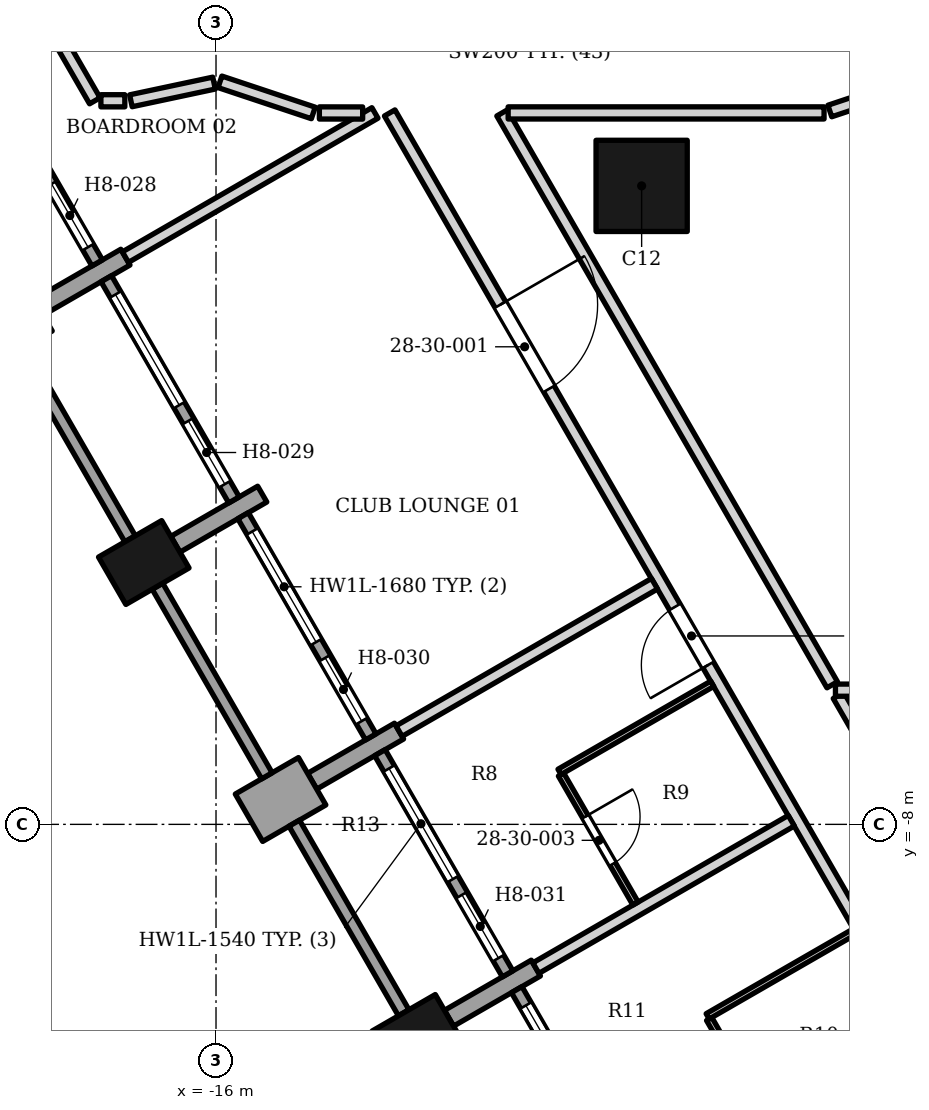
"""IFC4 building model, lengths in metres.
Left out: names, types, materials, properties, quantities, classifications, styles, units other than length and angle.
Written with IfcOpenShell. Run it as: python <this file> out.ifc"""

import sys

from ifc_helpers import new_model, si_unit, direction, frame, frame_2d, origin, origin_2d, place, context, subcontext, project, spatial, rectangle, extrude, element, fill, save


model = new_model("IFC4")
c1 = context("Model", 3, precision=1e-05, world=origin(), true_north=direction((0.0, 1.0)))
c2 = subcontext(c1, "Body", "Model", "MODEL_VIEW")
j1 = project(units=[si_unit("LENGTHUNIT", "METRE"), si_unit("PLANEANGLEUNIT", "RADIAN")], contexts=[c1])
p1 = place(None, origin())
s1 = spatial("IfcSite", under=j1, at=p1, CompositionType="ELEMENT")
p2 = place(p1, origin())
s2 = spatial("IfcBuilding", under=s1, at=p2, CompositionType="ELEMENT")
p3 = place(p2, frame((0.0, 0.0, 122.4)))
s3 = spatial("IfcBuildingStorey", under=s2, at=p3, CompositionType="ELEMENT", Elevation=122.4)
p4 = place(p3, frame((-9.0, 2.5, 0.0), z_axis=(0.0, 0.0, 1.0), x_axis=(1.0, 0.0, 0.0)))
e1 = element("IfcColumn", 1, at=p4, inside=s3, PredefinedType="COLUMN", context=c2, shape_type="SweptSolid", body=[
    extrude(rectangle(XDim=1.5, YDim=1.5, at=origin_2d()), origin(), (0.0, 0.0, 1.0), 3.4),
])
for number, where, z_axis, x_axis in (
    (2, (-17.188, -3.694, 0.0), (0.0, 0.0, 1.0), (0.5, -0.866, 0.0)),
    (3, (-12.688, -11.488, 0.0), (0.0, 0.0, 1.0), (0.5, -0.866, 0.0)),
):
    element("IfcColumn", number, at=place(p3, frame(where, z_axis=z_axis, x_axis=x_axis)), inside=s3, PredefinedType="COLUMN", context=c2, shape_type="SweptSolid", body=[
        extrude(rectangle(XDim=0.9, YDim=1.2, at=origin_2d()), origin(), (0.0, 0.0, 1.0), 3.4),
    ])
p5 = place(p3, frame((-19.958, -0.097, 0.0), z_axis=(0.0, 0.0, 1.0), x_axis=(0.865955154139, 0.50012165622, 0.0)))
e4 = element("IfcWall", 4, at=p5, inside=s3, PredefinedType="SOLIDWALL", context=c2, shape_type="SweptSolid", body=[
    extrude(rectangle(XDim=1.2, YDim=0.9, at=frame_2d((0.6, 0.0))), origin(), (0.0, 0.0, 1.0), 2.63),
])
p6 = place(p3, frame((-18.919, 0.503, 0.0), z_axis=(0.0, 0.0, 1.0), x_axis=(0.866040211805, 0.499974350878, 0.0)))
e5 = element("IfcWall", 5, at=p6, inside=s3, PredefinedType="SOLIDWALL", context=c2, shape_type="SweptSolid", body=[
    extrude(rectangle(XDim=1.65, YDim=0.3, at=frame_2d((0.825, 0.0))), origin(), (0.0, 0.0, 1.0), 2.65),
])
p7 = place(p3, frame((-16.668, -3.394, 0.0), z_axis=(0.0, 0.0, 1.0), x_axis=(0.866003217194, 0.500038426333, 0.0)))
e6 = element("IfcWall", 6, at=p7, inside=s3, PredefinedType="SOLIDWALL", context=c2, shape_type="SweptSolid", body=[
    extrude(rectangle(XDim=1.65, YDim=0.3, at=frame_2d((0.825, 0.0))), origin(), (0.0, 0.0, 1.0), 2.628),
])
p8 = place(p3, frame((-15.458, -7.891, 0.0), z_axis=(0.0, 0.0, 1.0), x_axis=(0.866043267704, 0.499969057507, 0.0)))
e7 = element("IfcWall", 7, at=p8, inside=s3, PredefinedType="SOLIDWALL", context=c2, shape_type="SweptSolid", body=[
    extrude(rectangle(XDim=1.2, YDim=0.9, at=frame_2d((0.6, 0.0))), origin(), (0.0, 0.0, 1.0), 2.63),
])
p9 = place(p3, frame((-14.419, -7.291, 0.0), z_axis=(0.0, 0.0, 1.0), x_axis=(0.865976140824, 0.500085316245, 0.0)))
e8 = element("IfcWall", 8, at=p9, inside=s3, PredefinedType="SOLIDWALL", context=c2, shape_type="SweptSolid", body=[
    extrude(rectangle(XDim=1.65, YDim=0.3, at=frame_2d((0.825, 0.0))), origin(), (0.0, 0.0, 1.0), 2.384),
])
p10 = place(p3, frame((-12.168, -11.188, 0.0), z_axis=(0.0, 0.0, 1.0), x_axis=(0.865966208357, 0.500102515474, 0.0)))
e9 = element("IfcWall", 9, at=p10, inside=s3, PredefinedType="SOLIDWALL", context=c2, shape_type="SweptSolid", body=[
    extrude(rectangle(XDim=1.65, YDim=0.3, at=frame_2d((0.825, 0.0))), origin(), (0.0, 0.0, 1.0), 2.242),
])
p11 = place(p3, frame((-20.054, 4.87, 0.0), z_axis=(0.0, 0.0, 1.0), x_axis=(0.500002543286, -0.866023935413, 0.0)))
e10 = element("IfcWall", 10, at=p11, inside=s3, PredefinedType="ELEMENTEDWALL", context=c2, shape_type="SweptSolid", body=[
    extrude(rectangle(XDim=4.2, YDim=0.2, at=frame_2d((2.1, 0.0))), origin(), (0.0, 0.0, 1.0), 2.45),
])
p12 = place(p11, frame((0.3, 0.0, 0.6)))
e11 = element("IfcOpeningElement", 11, at=p12, cuts=e10, PredefinedType="OPENING", context=c2, shape_type="SweptSolid", body=[
    extrude(rectangle(XDim=2.1, YDim=1.75, at=frame_2d((1.05, 0.875))), frame((0.0, 0.11, 0.0), z_axis=(0.0, -1.0, 0.0), x_axis=(1.0, 0.0, 0.0)), (0.0, 0.0, 1.0), 0.22),
])
p13 = place(p11, frame((2.7, 0.0, 0.0)))
e12 = element("IfcOpeningElement", 12, at=p13, cuts=e10, PredefinedType="OPENING", context=c2, shape_type="SweptSolid", body=[
    extrude(rectangle(XDim=1.2, YDim=2.35, at=frame_2d((0.6, 1.175))), frame((0.0, 0.11, 0.0), z_axis=(0.0, -1.0, 0.0), x_axis=(1.0, 0.0, 0.0)), (0.0, 0.0, 1.0), 0.22),
])
p14 = place(p3, frame((-19.213, -0.187, 0.0), z_axis=(0.0, 0.0, 1.0), x_axis=(0.499982693035, -0.866035395735, 0.0)))
e13 = element("IfcWall", 13, at=p14, inside=s3, PredefinedType="SOLIDWALL", context=c2, shape_type="SweptSolid", body=[
    extrude(rectangle(XDim=3.6, YDim=0.2, at=frame_2d((1.8, 0.0))), origin(), (0.0, 0.0, 1.0), 2.63),
])
p15 = place(p3, frame((-17.804, 0.973, 0.0), z_axis=(0.0, 0.0, 1.0), x_axis=(0.500027713859, -0.866009402589, 0.0)))
e14 = element("IfcWall", 14, at=p15, inside=s3, PredefinedType="ELEMENTEDWALL", context=c2, shape_type="SweptSolid", body=[
    extrude(rectangle(XDim=4.2, YDim=0.2, at=frame_2d((2.1, 0.0))), origin(), (0.0, 0.0, 1.0), 2.628),
])
p16 = place(p15, frame((0.3, 0.0, 0.6)))
e15 = element("IfcOpeningElement", 15, at=p16, cuts=e14, PredefinedType="OPENING", context=c2, shape_type="SweptSolid", body=[
    extrude(rectangle(XDim=2.1, YDim=1.8, at=frame_2d((1.05, 0.9))), frame((0.0, 0.11, 0.0), z_axis=(0.0, -1.0, 0.0), x_axis=(1.0, 0.0, 0.0)), (0.0, 0.0, 1.0), 0.22),
])
p17 = place(p15, frame((2.7, 0.0, 0.0)))
e16 = element("IfcOpeningElement", 16, at=p17, cuts=e14, PredefinedType="OPENING", context=c2, shape_type="SweptSolid", body=[
    extrude(rectangle(XDim=1.2, YDim=2.4, at=frame_2d((0.6, 1.2))), frame((0.0, 0.11, 0.0), z_axis=(0.0, -1.0, 0.0), x_axis=(1.0, 0.0, 0.0)), (0.0, 0.0, 1.0), 0.22),
])
p18 = place(p3, frame((-16.963, -4.084, 0.0), z_axis=(0.0, 0.0, 1.0), x_axis=(0.500012057535, -0.866018442252, 0.0)))
e17 = element("IfcWall", 17, at=p18, inside=s3, PredefinedType="SOLIDWALL", context=c2, shape_type="SweptSolid", body=[
    extrude(rectangle(XDim=3.6, YDim=0.2, at=frame_2d((1.8, 0.0))), origin(), (0.0, 0.0, 1.0), 2.63),
])
p19 = place(p3, frame((-15.554, -2.924, 0.0), z_axis=(0.0, 0.0, 1.0), x_axis=(0.500002543286, -0.866023935413, 0.0)))
e18 = element("IfcWall", 18, at=p19, inside=s3, PredefinedType="ELEMENTEDWALL", context=c2, shape_type="SweptSolid", body=[
    extrude(rectangle(XDim=4.2, YDim=0.2, at=frame_2d((2.1, 0.0))), origin(), (0.0, 0.0, 1.0), 2.384),
])
p20 = place(p19, frame((0.3, 0.0, 0.6)))
e19 = element("IfcOpeningElement", 19, at=p20, cuts=e18, PredefinedType="OPENING", context=c2, shape_type="SweptSolid", body=[
    extrude(rectangle(XDim=2.1, YDim=1.68, at=frame_2d((1.05, 0.84))), frame((0.0, 0.11, 0.0), z_axis=(0.0, -1.0, 0.0), x_axis=(1.0, 0.0, 0.0)), (0.0, 0.0, 1.0), 0.22),
])
p21 = place(p19, frame((2.7, 0.0, 0.0)))
e20 = element("IfcOpeningElement", 20, at=p21, cuts=e18, PredefinedType="OPENING", context=c2, shape_type="SweptSolid", body=[
    extrude(rectangle(XDim=1.2, YDim=2.28, at=frame_2d((0.6, 1.14))), frame((0.0, 0.11, 0.0), z_axis=(0.0, -1.0, 0.0), x_axis=(1.0, 0.0, 0.0)), (0.0, 0.0, 1.0), 0.22),
])
p22 = place(p3, frame((-14.713, -7.981, 0.0), z_axis=(0.0, 0.0, 1.0), x_axis=(0.500012057535, -0.866018442252, 0.0)))
e21 = element("IfcWall", 21, at=p22, inside=s3, PredefinedType="SOLIDWALL", context=c2, shape_type="SweptSolid", body=[
    extrude(rectangle(XDim=3.6, YDim=0.2, at=frame_2d((1.8, 0.0))), origin(), (0.0, 0.0, 1.0), 2.474),
])
p23 = place(p3, frame((-13.304, -6.821, 0.0), z_axis=(0.0, 0.0, 1.0), x_axis=(0.500027713859, -0.866009402589, 0.0)))
e22 = element("IfcWall", 22, at=p23, inside=s3, PredefinedType="ELEMENTEDWALL", context=c2, shape_type="SweptSolid", body=[
    extrude(rectangle(XDim=4.2, YDim=0.2, at=frame_2d((2.1, 0.0))), origin(), (0.0, 0.0, 1.0), 2.242),
])
p24 = place(p23, frame((0.3, 0.0, 0.6)))
e23 = element("IfcOpeningElement", 23, at=p24, cuts=e22, PredefinedType="OPENING", context=c2, shape_type="SweptSolid", body=[
    extrude(rectangle(XDim=2.1, YDim=1.54, at=frame_2d((1.05, 0.77))), frame((0.0, 0.11, 0.0), z_axis=(0.0, -1.0, 0.0), x_axis=(1.0, 0.0, 0.0)), (0.0, 0.0, 1.0), 0.22),
])
p25 = place(p23, frame((2.7, 0.0, 0.0)))
e24 = element("IfcOpeningElement", 24, at=p25, cuts=e22, PredefinedType="OPENING", context=c2, shape_type="SweptSolid", body=[
    extrude(rectangle(XDim=1.2, YDim=2.14, at=frame_2d((0.6, 1.07))), frame((0.0, 0.11, 0.0), z_axis=(0.0, -1.0, 0.0), x_axis=(1.0, 0.0, 0.0)), (0.0, 0.0, 1.0), 0.22),
])
p26 = place(p3, frame((-11.054, -10.718, 0.0), z_axis=(0.0, 0.0, 1.0), x_axis=(0.500027713859, -0.866009402589, 0.0)))
e25 = element("IfcWall", 25, at=p26, inside=s3, PredefinedType="ELEMENTEDWALL", context=c2, shape_type="SweptSolid", body=[
    extrude(rectangle(XDim=4.2, YDim=0.2, at=frame_2d((2.1, 0.0))), origin(), (0.0, 0.0, 1.0), 2.242),
])
p27 = place(p26, frame((0.3, 0.0, 0.6)))
e26 = element("IfcOpeningElement", 26, at=p27, cuts=e25, PredefinedType="OPENING", context=c2, shape_type="SweptSolid", body=[
    extrude(rectangle(XDim=2.1, YDim=1.54, at=frame_2d((1.05, 0.77))), frame((0.0, 0.11, 0.0), z_axis=(0.0, -1.0, 0.0), x_axis=(1.0, 0.0, 0.0)), (0.0, 0.0, 1.0), 0.22),
])
p28 = place(p26, frame((2.7, 0.0, 0.0)))
e27 = element("IfcOpeningElement", 27, at=p28, cuts=e25, PredefinedType="OPENING", context=c2, shape_type="SweptSolid", body=[
    extrude(rectangle(XDim=1.2, YDim=2.14, at=frame_2d((0.6, 1.07))), frame((0.0, 0.11, 0.0), z_axis=(0.0, -1.0, 0.0), x_axis=(1.0, 0.0, 0.0)), (0.0, 0.0, 1.0), 0.22),
])
p29 = place(p3, frame((-7.889, -11.2, 0.0), z_axis=(0.0, 0.0, 1.0), x_axis=(0.500697021662, -0.865622603967, 0.0)))
e28 = element("IfcWall", 28, at=p29, inside=s3, PredefinedType="PARTITIONING", context=c2, shape_type="SweptSolid", body=[
    extrude(rectangle(XDim=2.298, YDim=0.1, at=frame_2d((1.149, 0.0))), origin(), (0.0, 0.0, 1.0), 2.242),
])
p30 = place(p29, frame((0.75, 0.0, 0.0)))
e29 = element("IfcOpeningElement", 29, at=p30, cuts=e28, PredefinedType="OPENING", context=c2, shape_type="SweptSolid", body=[
    extrude(rectangle(XDim=0.8, YDim=2.1, at=frame_2d((0.4, 1.05))), frame((0.0, 0.06, 0.0), z_axis=(0.0, -1.0, 0.0), x_axis=(1.0, 0.0, 0.0)), (0.0, 0.0, 1.0), 0.12),
])
p31 = place(p3, frame((-7.914, -11.157, 0.0), z_axis=(0.0, 0.0, 1.0), x_axis=(0.866288634608, 0.499543793424, 0.0)))
e30 = element("IfcWall", 30, at=p31, inside=s3, PredefinedType="PARTITIONING", context=c2, shape_type="SweptSolid", body=[
    extrude(rectangle(XDim=2.8, YDim=0.1, at=frame_2d((1.4, 0.0))), origin(), (0.0, 0.0, 1.0), 2.242),
])
p32 = place(p3, frame((-13.143, 3.7, 0.0), z_axis=(0.0, 0.0, 1.0), x_axis=(0.499816656841, -0.866131231133, 0.0)))
e31 = element("IfcWall", 31, at=p32, inside=s3, PredefinedType="PARTITIONING", context=c2, shape_type="SweptSolid", body=[
    extrude(rectangle(XDim=15.48, YDim=0.2, at=frame_2d((7.74, 0.0))), origin(), (0.0, 0.0, 1.0), 2.242),
])
p33 = place(p32, frame((3.64, 0.0, 0.0)))
e32 = element("IfcOpeningElement", 32, at=p33, cuts=e31, PredefinedType="OPENING", context=c2, shape_type="SweptSolid", body=[
    extrude(rectangle(XDim=1.6, YDim=2.1, at=frame_2d((0.8, 1.05))), frame((0.0, 0.11, 0.0), z_axis=(0.0, -1.0, 0.0), x_axis=(1.0, 0.0, 0.0)), (0.0, 0.0, 1.0), 0.22),
])
p34 = place(p32, frame((9.381, 0.0, 0.0)))
e33 = element("IfcOpeningElement", 33, at=p34, cuts=e31, PredefinedType="OPENING", context=c2, shape_type="SweptSolid", body=[
    extrude(rectangle(XDim=1.1, YDim=2.1, at=frame_2d((0.55, 1.05))), frame((0.0, 0.11, 0.0), z_axis=(0.0, -1.0, 0.0), x_axis=(1.0, 0.0, 0.0)), (0.0, 0.0, 1.0), 0.22),
])
p35 = place(p3, frame((-10.74, -10.363, 0.0), z_axis=(0.0, 0.0, 1.0), x_axis=(0.866231677814, 0.499642552583, 0.0)))
e34 = element("IfcWall", 34, at=p35, inside=s3, PredefinedType="PARTITIONING", context=c2, shape_type="SweptSolid", body=[
    extrude(rectangle(XDim=4.85, YDim=0.2, at=frame_2d((2.425, 0.0))), origin(), (0.0, 0.0, 1.0), 2.242),
])
p36 = place(p3, frame((-10.326, -7.18, 0.0), z_axis=(0.0, 0.0, 1.0), x_axis=(0.500018594424, -0.866014668023, 0.0)))
e35 = element("IfcWall", 35, at=p36, inside=s3, PredefinedType="PARTITIONING", context=c2, shape_type="SweptSolid", body=[
    extrude(rectangle(XDim=2.45, YDim=0.1, at=frame_2d((1.225, 0.0))), origin(), (0.0, 0.0, 1.0), 2.474),
])
p37 = place(p36, frame((0.8, 0.0, 0.0)))
e36 = element("IfcOpeningElement", 36, at=p37, cuts=e35, PredefinedType="OPENING", context=c2, shape_type="SweptSolid", body=[
    extrude(rectangle(XDim=0.9, YDim=2.1, at=frame_2d((0.45, 1.05))), frame((0.0, 0.06, 0.0), z_axis=(0.0, -1.0, 0.0), x_axis=(1.0, 0.0, 0.0)), (0.0, 0.0, 1.0), 0.12),
])
p38 = place(p3, frame((-5.763, -5.88, 0.0), z_axis=(0.0, 0.0, 1.0), x_axis=(0.500006842847, -0.866021453029, 0.0)))
e37 = element("IfcWall", 37, at=p38, inside=s3, PredefinedType="PARTITIONING", context=c2, shape_type="SweptSolid", body=[
    extrude(rectangle(XDim=11.493, YDim=0.2, at=frame_2d((5.747, 0.0))), origin(), (0.0, 0.0, 1.0), 2.242),
])
p39 = place(p38, frame((6.914, 0.0, 0.0)))
e38 = element("IfcOpeningElement", 38, at=p39, cuts=e37, PredefinedType="OPENING", context=c2, shape_type="SweptSolid", body=[
    extrude(rectangle(XDim=0.9, YDim=2.1, at=frame_2d((0.45, 1.05))), frame((0.0, 0.11, 0.0), z_axis=(0.0, -1.0, 0.0), x_axis=(1.0, 0.0, 0.0)), (0.0, 0.0, 1.0), 0.22),
])
p40 = place(p3, frame((-5.812, -5.793, 0.0), z_axis=(0.0, 0.0, 1.0), x_axis=(0.999999989135, 0.000147408763, 0.0)))
e39 = element("IfcWall", 39, at=p40, inside=s3, PredefinedType="PARTITIONING", context=c2, shape_type="SweptSolid", body=[
    extrude(rectangle(XDim=11.594, YDim=0.2, at=frame_2d((5.797, 0.0))), origin(), (0.0, 0.0, 1.0), 3.23),
])
p41 = place(p3, frame((-10.351, -7.137, 0.0), z_axis=(0.0, 0.0, 1.0), x_axis=(0.86625706142, 0.499598542372, 0.0)))
e40 = element("IfcWall", 40, at=p41, inside=s3, PredefinedType="PARTITIONING", context=c2, shape_type="SweptSolid", body=[
    extrude(rectangle(XDim=2.9, YDim=0.1, at=frame_2d((1.45, 0.0))), origin(), (0.0, 0.0, 1.0), 2.474),
])
p42 = place(p3, frame((-12.99, -6.466, 0.0), z_axis=(0.0, 0.0, 1.0), x_axis=(0.866209889287, 0.49968032551, 0.0)))
e41 = element("IfcWall", 41, at=p42, inside=s3, PredefinedType="PARTITIONING", context=c2, shape_type="SweptSolid", body=[
    extrude(rectangle(XDim=4.85, YDim=0.2, at=frame_2d((2.425, 0.0))), origin(), (0.0, 0.0, 1.0), 2.242),
])
p43 = place(p3, frame((-17.49, 1.329, 0.0), z_axis=(0.0, 0.0, 1.0), x_axis=(0.865884411482, 0.500244126355, 0.0)))
e42 = element("IfcWall", 42, at=p43, inside=s3, PredefinedType="PARTITIONING", context=c2, shape_type="SweptSolid", body=[
    extrude(rectangle(XDim=4.74, YDim=0.2, at=frame_2d((2.37, 0.0))), origin(), (0.0, 0.0, 1.0), 2.384),
])
p44 = place(p3, frame((-15.935, 4.211, 0.0), z_axis=(0.0, 0.0, 1.0), x_axis=(0.948653110684, -0.316318313712, 0.0)))
e43 = element("IfcWall", 43, at=p44, inside=s3, PredefinedType="PARTITIONING", context=c2, shape_type="SweptSolid", body=[
    extrude(rectangle(XDim=1.618, YDim=0.2, at=frame_2d((0.809, 0.0))), origin(), (0.0, 0.0, 1.0), 2.628),
])
p45 = place(p3, frame((-14.3, 3.699, 0.0), z_axis=(0.0, 0.0, 1.0), x_axis=(0.999998529944, -0.00171467512, 0.0)))
e44 = element("IfcWall", 44, at=p45, inside=s3, PredefinedType="PARTITIONING", context=c2, shape_type="SweptSolid", body=[
    extrude(rectangle(XDim=0.712, YDim=0.2, at=frame_2d((0.356, 0.0))), origin(), (0.0, 0.0, 1.0), 3.23),
])
p46 = place(p3, frame((-11.295, 3.7, 0.0), z_axis=(0.0, 0.0, 1.0), x_axis=(0.500007885066, -0.866020851292, 0.0)))
e45 = element("IfcWall", 45, at=p46, inside=s3, PredefinedType="PARTITIONING", context=c2, shape_type="SweptSolid", body=[
    extrude(rectangle(XDim=10.859, YDim=0.2, at=frame_2d((5.43, 0.0))), origin(), (0.0, 0.0, 1.0), 2.242),
])
p47 = place(p3, frame((-11.195, 3.7, 0.0), z_axis=(0.0, 0.0, 1.0), x_axis=(1.0, 0.0, 0.0)))
e46 = element("IfcWall", 46, at=p47, inside=s3, PredefinedType="PARTITIONING", context=c2, shape_type="SweptSolid", body=[
    extrude(rectangle(XDim=5.195, YDim=0.2, at=frame_2d((2.598, 0.0))), origin(), (0.0, 0.0, 1.0), 2.242),
])
p48 = place(p3, frame((-19.0, 5.644, 0.0), z_axis=(0.0, 0.0, 1.0), x_axis=(0.500075657258, -0.86598171864, 0.0)))
e47 = element("IfcWall", 47, at=p48, inside=s3, PredefinedType="PARTITIONING", context=c2, shape_type="SweptSolid", body=[
    extrude(rectangle(XDim=2.014, YDim=0.2, at=frame_2d((1.007, 0.0))), origin(), (0.0, 0.0, 1.0), 2.45),
])
p49 = place(p3, frame((-17.893, 3.899, 0.0), z_axis=(0.0, 0.0, 1.0), x_axis=(1.0, 0.0, 0.0)))
e48 = element("IfcWall", 48, at=p49, inside=s3, PredefinedType="PARTITIONING", context=c2, shape_type="SweptSolid", body=[
    extrude(rectangle(XDim=0.393, YDim=0.2, at=frame_2d((0.197, 0.0))), origin(), (0.0, 0.0, 1.0), 3.23),
])
p50 = place(p3, frame((-17.4, 3.899, 0.0), z_axis=(0.0, 0.0, 1.0), x_axis=(0.978123323974, 0.208025871224, 0.0)))
e49 = element("IfcWall", 49, at=p50, inside=s3, PredefinedType="PARTITIONING", context=c2, shape_type="SweptSolid", body=[
    extrude(rectangle(XDim=1.398, YDim=0.2, at=frame_2d((0.699, 0.0))), origin(), (0.0, 0.0, 1.0), 3.23),
])
p51 = place(p3, frame((-5.905, 3.731, 0.0), z_axis=(0.0, 0.0, 1.0), x_axis=(0.948668476379, 0.316272227557, 0.0)))
e50 = element("IfcWall", 50, at=p51, inside=s3, PredefinedType="PARTITIONING", context=c2, shape_type="SweptSolid", body=[
    extrude(rectangle(XDim=1.647, YDim=0.2, at=frame_2d((0.824, 0.0))), origin(), (0.0, 0.0, 1.0), 2.242),
])
p52 = place(p13, origin())
e51 = element("IfcDoor", 51, at=p52, inside=s3, OperationType="SINGLE_SWING_LEFT", PredefinedType="DOOR", context=c2, shape_type="SweptSolid", body=[
    extrude(rectangle(XDim=1.2, YDim=2.35, at=frame_2d((0.6, 1.175))), frame((0.0, 0.025, 0.0), z_axis=(0.0, -1.0, 0.0), x_axis=(1.0, 0.0, 0.0)), (0.0, 0.0, 1.0), 0.05),
])
fill(e12, e51)
p53 = place(p16, origin())
e52 = element("IfcWindow", 52, at=p53, inside=s3, PartitioningType="SINGLE_PANEL", PredefinedType="WINDOW", context=c2, shape_type="SweptSolid", body=[
    extrude(rectangle(XDim=2.1, YDim=1.8, at=frame_2d((1.05, 0.9))), frame((0.0, 0.03, 0.0), z_axis=(0.0, -1.0, 0.0), x_axis=(1.0, 0.0, 0.0)), (0.0, 0.0, 1.0), 0.06),
])
fill(e15, e52)
p54 = place(p17, origin())
e53 = element("IfcDoor", 53, at=p54, inside=s3, OperationType="SINGLE_SWING_LEFT", PredefinedType="DOOR", context=c2, shape_type="SweptSolid", body=[
    extrude(rectangle(XDim=1.2, YDim=2.4, at=frame_2d((0.6, 1.2))), frame((0.0, 0.025, 0.0), z_axis=(0.0, -1.0, 0.0), x_axis=(1.0, 0.0, 0.0)), (0.0, 0.0, 1.0), 0.05),
])
fill(e16, e53)
p55 = place(p20, origin())
e54 = element("IfcWindow", 54, at=p55, inside=s3, PartitioningType="SINGLE_PANEL", PredefinedType="WINDOW", context=c2, shape_type="SweptSolid", body=[
    extrude(rectangle(XDim=2.1, YDim=1.68, at=frame_2d((1.05, 0.84))), frame((0.0, 0.03, 0.0), z_axis=(0.0, -1.0, 0.0), x_axis=(1.0, 0.0, 0.0)), (0.0, 0.0, 1.0), 0.06),
])
fill(e19, e54)
p56 = place(p21, origin())
e55 = element("IfcDoor", 55, at=p56, inside=s3, OperationType="SINGLE_SWING_LEFT", PredefinedType="DOOR", context=c2, shape_type="SweptSolid", body=[
    extrude(rectangle(XDim=1.2, YDim=2.28, at=frame_2d((0.6, 1.14))), frame((0.0, 0.025, 0.0), z_axis=(0.0, -1.0, 0.0), x_axis=(1.0, 0.0, 0.0)), (0.0, 0.0, 1.0), 0.05),
])
fill(e20, e55)
p57 = place(p24, origin())
e56 = element("IfcWindow", 56, at=p57, inside=s3, PartitioningType="SINGLE_PANEL", PredefinedType="WINDOW", context=c2, shape_type="SweptSolid", body=[
    extrude(rectangle(XDim=2.1, YDim=1.54, at=frame_2d((1.05, 0.77))), frame((0.0, 0.03, 0.0), z_axis=(0.0, -1.0, 0.0), x_axis=(1.0, 0.0, 0.0)), (0.0, 0.0, 1.0), 0.06),
])
fill(e23, e56)
p58 = place(p25, origin())
e57 = element("IfcDoor", 57, at=p58, inside=s3, OperationType="SINGLE_SWING_LEFT", PredefinedType="DOOR", context=c2, shape_type="SweptSolid", body=[
    extrude(rectangle(XDim=1.2, YDim=2.14, at=frame_2d((0.6, 1.07))), frame((0.0, 0.025, 0.0), z_axis=(0.0, -1.0, 0.0), x_axis=(1.0, 0.0, 0.0)), (0.0, 0.0, 1.0), 0.05),
])
fill(e24, e57)
p59 = place(p27, origin())
e58 = element("IfcWindow", 58, at=p59, inside=s3, PartitioningType="SINGLE_PANEL", PredefinedType="WINDOW", context=c2, shape_type="SweptSolid", body=[
    extrude(rectangle(XDim=2.1, YDim=1.54, at=frame_2d((1.05, 0.77))), frame((0.0, 0.03, 0.0), z_axis=(0.0, -1.0, 0.0), x_axis=(1.0, 0.0, 0.0)), (0.0, 0.0, 1.0), 0.06),
])
fill(e26, e58)
p60 = place(p33, origin())
e59 = element("IfcDoor", 59, at=p60, inside=s3, OperationType="DOUBLE_DOOR_SINGLE_SWING", PredefinedType="DOOR", context=c2, shape_type="SweptSolid", body=[
    extrude(rectangle(XDim=1.6, YDim=2.1, at=frame_2d((0.8, 1.05))), frame((0.0, 0.025, 0.0), z_axis=(0.0, -1.0, 0.0), x_axis=(1.0, 0.0, 0.0)), (0.0, 0.0, 1.0), 0.05),
])
fill(e32, e59)
p61 = place(p34, origin())
e60 = element("IfcDoor", 60, at=p61, inside=s3, OperationType="SINGLE_SWING_RIGHT", PredefinedType="DOOR", context=c2, shape_type="SweptSolid", body=[
    extrude(rectangle(XDim=1.1, YDim=2.1, at=frame_2d((0.55, 1.05))), frame((0.0, 0.025, 0.0), z_axis=(0.0, -1.0, 0.0), x_axis=(1.0, 0.0, 0.0)), (0.0, 0.0, 1.0), 0.05),
])
fill(e33, e60)
p62 = place(p37, origin())
e61 = element("IfcDoor", 61, at=p62, inside=s3, OperationType="SINGLE_SWING_LEFT", PredefinedType="DOOR", context=c2, shape_type="SweptSolid", body=[
    extrude(rectangle(XDim=0.9, YDim=2.1, at=frame_2d((0.45, 1.05))), frame((0.0, 0.025, 0.0), z_axis=(0.0, -1.0, 0.0), x_axis=(1.0, 0.0, 0.0)), (0.0, 0.0, 1.0), 0.05),
])
fill(e36, e61)
save(model, sys.argv[1])
